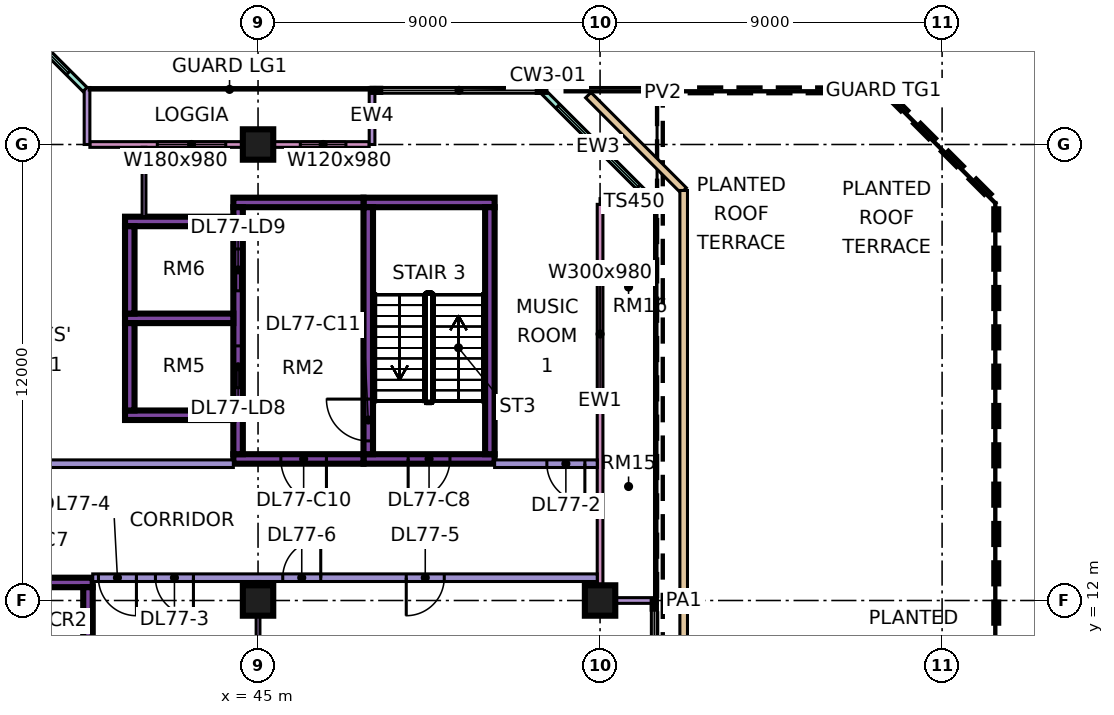
"""IFC4 building model, lengths in metres.
Left out: names, types, materials, properties, quantities, classifications, styles, units other than length and angle.
Written with IfcOpenShell. Run it as: python <this file> out.ifc"""

import sys

from ifc_helpers import new_model, si_unit, direction, frame, frame_2d, origin, origin_2d, place, context, subcontext, project, spatial, rectangle, extrude, element, fill, save


model = new_model("IFC4")
c1 = context("Model", 3, precision=1e-05, world=origin(), true_north=direction((0.0, 1.0)))
c2 = subcontext(c1, "Body", "Model", "MODEL_VIEW")
j1 = project(units=[si_unit("LENGTHUNIT", "METRE"), si_unit("PLANEANGLEUNIT", "RADIAN")], contexts=[c1])
p1 = place(None, origin())
s1 = spatial("IfcSite", under=j1, at=p1, CompositionType="ELEMENT")
p2 = place(p1, origin())
s2 = spatial("IfcBuilding", under=s1, at=p2, CompositionType="ELEMENT")
p3 = place(p2, frame((0.0, 0.0, 327.65)))
s3 = spatial("IfcBuildingStorey", under=s2, at=p3, CompositionType="ELEMENT", Elevation=327.65)
for number, where, z_axis, x_axis in (
    (1, (45.0, 12.0, 0.0), (0.0, 0.0, 1.0), (1.0, 0.0, 0.0)),
    (2, (45.0, 24.0, 0.0), (0.0, 0.0, 1.0), (1.0, 0.0, 0.0)),
    (3, (54.0, 12.0, 0.0), (0.0, 0.0, 1.0), (1.0, 0.0, 0.0)),
):
    element("IfcColumn", number, at=place(p3, frame(where, z_axis=z_axis, x_axis=x_axis)), inside=s3, PredefinedType="COLUMN", context=c2, shape_type="SweptSolid", body=[
        extrude(rectangle(XDim=0.8, YDim=0.8, at=origin_2d()), origin(), (0.0, 0.0, 1.0), 11.25),
    ])
p4 = place(p3, frame((36.4, 12.475, 0.0), z_axis=(0.0, 0.0, 1.0), x_axis=(1.0, 0.0, 0.0)))
e4 = element("IfcWall", 4, at=p4, inside=s3, PredefinedType="SHEAR", context=c2, shape_type="SweptSolid", body=[
    extrude(rectangle(XDim=4.25, YDim=0.25, at=frame_2d((2.125, 0.0))), origin(), (0.0, 0.0, 1.0), 11.25),
])
p5 = place(p4, frame((1.975, 0.0, 0.0)))
e5 = element("IfcOpeningElement", 5, at=p5, cuts=e4, PredefinedType="OPENING", context=c2, shape_type="SweptSolid", body=[
    extrude(rectangle(XDim=1.1, YDim=2.2, at=frame_2d((0.55, 1.1))), frame((0.0, 0.135, 0.0), z_axis=(0.0, -1.0, 0.0), x_axis=(1.0, 0.0, 0.0)), (0.0, 0.0, 1.0), 0.27),
])
p6 = place(p3, frame((40.525, 5.85, 0.0), z_axis=(0.0, 0.0, 1.0), x_axis=(0.0, 1.0, 0.0)))
e6 = element("IfcWall", 6, at=p6, inside=s3, PredefinedType="SHEAR", context=c2, shape_type="SweptSolid", body=[
    extrude(rectangle(XDim=6.5, YDim=0.25, at=frame_2d((3.25, 0.0))), origin(), (0.0, 0.0, 1.0), 11.25),
])
p7 = place(p3, frame((47.775, 15.725, 0.0), z_axis=(0.0, 0.0, 1.0), x_axis=(1.0, 0.0, 0.0)))
e7 = element("IfcWall", 7, at=p7, inside=s3, PredefinedType="SHEAR", context=c2, shape_type="SweptSolid", body=[
    extrude(rectangle(XDim=3.45, YDim=0.25, at=frame_2d((1.725, 0.0))), origin(), (0.0, 0.0, 1.0), 11.25),
])
p8 = place(p7, frame((1.175, 0.0, 0.0)))
e8 = element("IfcOpeningElement", 8, at=p8, cuts=e7, PredefinedType="OPENING", context=c2, shape_type="SweptSolid", body=[
    extrude(rectangle(XDim=1.1, YDim=2.2, at=frame_2d((0.55, 1.1))), frame((0.0, 0.135, 0.0), z_axis=(0.0, -1.0, 0.0), x_axis=(1.0, 0.0, 0.0)), (0.0, 0.0, 1.0), 0.27),
])
p9 = place(p3, frame((47.775, 22.475, 0.0), z_axis=(0.0, 0.0, 1.0), x_axis=(1.0, 0.0, 0.0)))
e9 = element("IfcWall", 9, at=p9, inside=s3, PredefinedType="SHEAR", context=c2, shape_type="SweptSolid", body=[
    extrude(rectangle(XDim=3.45, YDim=0.25, at=frame_2d((1.725, 0.0))), origin(), (0.0, 0.0, 1.0), 11.25),
])
p10 = place(p3, frame((47.9, 15.85, 0.0), z_axis=(0.0, 0.0, 1.0), x_axis=(0.0, 1.0, 0.0)))
e10 = element("IfcWall", 10, at=p10, inside=s3, PredefinedType="SHEAR", context=c2, shape_type="SweptSolid", body=[
    extrude(rectangle(XDim=6.5, YDim=0.25, at=frame_2d((3.25, 0.0))), origin(), (0.0, 0.0, 1.0), 11.25),
])
p11 = place(p10, frame((0.35, 0.0, 0.0)))
e11 = element("IfcOpeningElement", 11, at=p11, cuts=e10, PredefinedType="OPENING", context=c2, shape_type="SweptSolid", body=[
    extrude(rectangle(XDim=1.1, YDim=2.2, at=frame_2d((0.55, 1.1))), frame((0.0, 0.135, 0.0), z_axis=(0.0, -1.0, 0.0), x_axis=(1.0, 0.0, 0.0)), (0.0, 0.0, 1.0), 0.27),
])
p12 = place(p3, frame((51.1, 15.85, 0.0), z_axis=(0.0, 0.0, 1.0), x_axis=(0.0, 1.0, 0.0)))
e12 = element("IfcWall", 12, at=p12, inside=s3, PredefinedType="SHEAR", context=c2, shape_type="SweptSolid", body=[
    extrude(rectangle(XDim=6.5, YDim=0.25, at=frame_2d((3.25, 0.0))), origin(), (0.0, 0.0, 1.0), 11.25),
])
p13 = place(p3, frame((44.35, 15.725, 0.0), z_axis=(0.0, 0.0, 1.0), x_axis=(1.0, 0.0, 0.0)))
e13 = element("IfcWall", 13, at=p13, inside=s3, PredefinedType="SHEAR", context=c2, shape_type="SweptSolid", body=[
    extrude(rectangle(XDim=3.425, YDim=0.25, at=frame_2d((1.712, 0.0))), origin(), (0.0, 0.0, 1.0), 11.25),
])
p14 = place(p13, frame((1.25, 0.0, 0.0)))
e14 = element("IfcOpeningElement", 14, at=p14, cuts=e13, PredefinedType="OPENING", context=c2, shape_type="SweptSolid", body=[
    extrude(rectangle(XDim=1.2, YDim=2.2, at=frame_2d((0.6, 1.1))), frame((0.0, 0.135, 0.0), z_axis=(0.0, -1.0, 0.0), x_axis=(1.0, 0.0, 0.0)), (0.0, 0.0, 1.0), 0.27),
])
p15 = place(p3, frame((44.35, 22.475, 0.0), z_axis=(0.0, 0.0, 1.0), x_axis=(1.0, 0.0, 0.0)))
e15 = element("IfcWall", 15, at=p15, inside=s3, PredefinedType="SHEAR", context=c2, shape_type="SweptSolid", body=[
    extrude(rectangle(XDim=3.425, YDim=0.25, at=frame_2d((1.712, 0.0))), origin(), (0.0, 0.0, 1.0), 11.25),
])
p16 = place(p3, frame((44.475, 15.85, 0.0), z_axis=(0.0, 0.0, 1.0), x_axis=(0.0, 1.0, 0.0)))
e16 = element("IfcWall", 16, at=p16, inside=s3, PredefinedType="SHEAR", context=c2, shape_type="SweptSolid", body=[
    extrude(rectangle(XDim=6.5, YDim=0.25, at=frame_2d((3.25, 0.0))), origin(), (0.0, 0.0, 1.0), 11.25),
])
p17 = place(p16, frame((1.75, 0.0, 0.0)))
e17 = element("IfcOpeningElement", 17, at=p17, cuts=e16, PredefinedType="OPENING", context=c2, shape_type="SweptSolid", body=[
    extrude(rectangle(XDim=1.1, YDim=2.2, at=frame_2d((0.55, 1.1))), frame((0.0, 0.135, 0.0), z_axis=(0.0, -1.0, 0.0), x_axis=(1.0, 0.0, 0.0)), (0.0, 0.0, 1.0), 0.27),
])
p18 = place(p16, frame((4.3, 0.0, 0.0)))
e18 = element("IfcOpeningElement", 18, at=p18, cuts=e16, PredefinedType="OPENING", context=c2, shape_type="SweptSolid", body=[
    extrude(rectangle(XDim=1.1, YDim=2.2, at=frame_2d((0.55, 1.1))), frame((0.0, 0.135, 0.0), z_axis=(0.0, -1.0, 0.0), x_axis=(1.0, 0.0, 0.0)), (0.0, 0.0, 1.0), 0.27),
])
for number, where, z_axis, x_axis in (
    (19, (41.5, 16.875, 0.0), (0.0, 0.0, 1.0), (1.0, 0.0, 0.0)),
    (20, (41.5, 19.425, 0.0), (0.0, 0.0, 1.0), (1.0, 0.0, 0.0)),
    (21, (41.5, 21.975, 0.0), (0.0, 0.0, 1.0), (1.0, 0.0, 0.0)),
):
    element("IfcWall", number, at=place(p3, frame(where, z_axis=z_axis, x_axis=x_axis)), inside=s3, PredefinedType="SHEAR", context=c2, shape_type="SweptSolid", body=[
        extrude(rectangle(XDim=2.85, YDim=0.25, at=frame_2d((1.425, 0.0))), origin(), (0.0, 0.0, 1.0), 11.25),
    ])
for number, where, z_axis, x_axis in (
    (22, (41.625, 17.0, 0.0), (0.0, 0.0, 1.0), (0.0, 1.0, 0.0)),
    (23, (41.625, 19.55, 0.0), (0.0, 0.0, 1.0), (0.0, 1.0, 0.0)),
):
    element("IfcWall", number, at=place(p3, frame(where, z_axis=z_axis, x_axis=x_axis)), inside=s3, PredefinedType="SHEAR", context=c2, shape_type="SweptSolid", body=[
        extrude(rectangle(XDim=2.3, YDim=0.25, at=frame_2d((1.15, 0.0))), origin(), (0.0, 0.0, 1.0), 11.25),
    ])
p19 = place(p3, frame((47.925, 24.0, 0.0), z_axis=(0.0, 0.0, 1.0), x_axis=(-1.0, 0.0, 0.0)))
e24 = element("IfcWall", 24, at=p19, inside=s3, PredefinedType="SOLIDWALL", context=c2, shape_type="SweptSolid", body=[
    extrude(rectangle(XDim=7.35, YDim=0.15, at=frame_2d((3.675, 0.0))), origin(), (0.0, 0.0, 1.0), 10.85),
])
p20 = place(p19, frame((0.613, 0.0, 0.45)))
e25 = element("IfcOpeningElement", 25, at=p20, cuts=e24, PredefinedType="OPENING", context=c2, shape_type="SweptSolid", body=[
    extrude(rectangle(XDim=1.2, YDim=9.8, at=frame_2d((0.6, 4.9))), frame((0.0, 0.085, 0.0), z_axis=(0.0, -1.0, 0.0), x_axis=(1.0, 0.0, 0.0)), (0.0, 0.0, 1.0), 0.17),
])
p21 = place(p19, frame((3.775, 0.0, 0.45)))
e26 = element("IfcOpeningElement", 26, at=p21, cuts=e24, PredefinedType="OPENING", context=c2, shape_type="SweptSolid", body=[
    extrude(rectangle(XDim=1.8, YDim=9.8, at=frame_2d((0.9, 4.9))), frame((0.0, 0.085, 0.0), z_axis=(0.0, -1.0, 0.0), x_axis=(1.0, 0.0, 0.0)), (0.0, 0.0, 1.0), 0.17),
])
for number, where, z_axis, x_axis in (
    (27, (48.0, 25.5, 0.0), (0.0, 0.0, 1.0), (0.0, -1.0, 0.0)),
    (28, (40.5, 25.5, 0.0), (0.0, 0.0, 1.0), (0.0, -1.0, 0.0)),
):
    element("IfcWall", number, at=place(p3, frame(where, z_axis=z_axis, x_axis=x_axis)), inside=s3, PredefinedType="SOLIDWALL", context=c2, shape_type="SweptSolid", body=[
        extrude(rectangle(XDim=1.5, YDim=0.15, at=frame_2d((0.75, 0.0))), origin(), (0.0, 0.0, 1.0), 10.85),
    ])
p22 = place(p3, frame((40.447, 25.447, 0.0), z_axis=(0.0, 0.0, 1.0), x_axis=(-0.707106781187, 0.707106781187, 0.0)))
e29 = element("IfcWall", 29, at=p22, inside=s3, PredefinedType="SOLIDWALL", context=c2, shape_type="SweptSolid", body=[
    extrude(rectangle(XDim=4.243, YDim=0.15, at=frame_2d((2.121, 0.0))), origin(), (0.0, 0.0, 1.0), 10.85),
])
p23 = place(p22, frame((0.621, 0.0, 0.45)))
e30 = element("IfcOpeningElement", 30, at=p23, cuts=e29, PredefinedType="OPENING", context=c2, shape_type="SweptSolid", body=[
    extrude(rectangle(XDim=3.0, YDim=9.8, at=frame_2d((1.5, 4.9))), frame((0.0, 0.085, 0.0), z_axis=(0.0, -1.0, 0.0), x_axis=(1.0, 0.0, 0.0)), (0.0, 0.0, 1.0), 0.17),
])
p24 = place(p3, frame((54.0, 12.075, 0.0), z_axis=(0.0, 0.0, 1.0), x_axis=(0.0, 1.0, 0.0)))
e31 = element("IfcWall", 31, at=p24, inside=s3, PredefinedType="SOLIDWALL", context=c2, shape_type="SweptSolid", body=[
    extrude(rectangle(XDim=10.35, YDim=0.15, at=frame_2d((5.175, 0.0))), origin(), (0.0, 0.0, 1.0), 10.85),
])
p25 = place(p24, frame((5.438, 0.0, 0.45)))
e32 = element("IfcOpeningElement", 32, at=p25, cuts=e31, PredefinedType="OPENING", context=c2, shape_type="SweptSolid", body=[
    extrude(rectangle(XDim=3.0, YDim=9.8, at=frame_2d((1.5, 4.9))), frame((0.0, 0.085, 0.0), z_axis=(0.0, -1.0, 0.0), x_axis=(1.0, 0.0, 0.0)), (0.0, 0.0, 1.0), 0.17),
])
for number, where, z_axis, x_axis in (
    (33, (55.5, 12.0, 0.0), (0.0, 0.0, 1.0), (-1.0, 0.0, 0.0)),
    (34, (55.5, 22.5, 0.0), (0.0, 0.0, 1.0), (-1.0, 0.0, 0.0)),
):
    element("IfcWall", number, at=place(p3, frame(where, z_axis=z_axis, x_axis=x_axis)), inside=s3, PredefinedType="SOLIDWALL", context=c2, shape_type="SweptSolid", body=[
        extrude(rectangle(XDim=1.5, YDim=0.15, at=frame_2d((0.75, 0.0))), origin(), (0.0, 0.0, 1.0), 10.85),
    ])
p26 = place(p3, frame((55.447, 22.447, 0.0), z_axis=(0.0, 0.0, 1.0), x_axis=(-0.707106781187, 0.707106781187, 0.0)))
e35 = element("IfcWall", 35, at=p26, inside=s3, PredefinedType="SOLIDWALL", context=c2, shape_type="SweptSolid", body=[
    extrude(rectangle(XDim=4.243, YDim=0.15, at=frame_2d((2.121, 0.0))), origin(), (0.0, 0.0, 1.0), 10.85),
])
p27 = place(p26, frame((0.621, 0.0, 0.45)))
e36 = element("IfcOpeningElement", 36, at=p27, cuts=e35, PredefinedType="OPENING", context=c2, shape_type="SweptSolid", body=[
    extrude(rectangle(XDim=3.0, YDim=9.8, at=frame_2d((1.5, 4.9))), frame((0.0, 0.085, 0.0), z_axis=(0.0, -1.0, 0.0), x_axis=(1.0, 0.0, 0.0)), (0.0, 0.0, 1.0), 0.17),
])
p28 = place(p3, frame((53.69, 25.3, 0.0), z_axis=(0.0, 0.0, 1.0), x_axis=(0.707106781187, -0.707106781187, 0.0)))
e37 = element("IfcWall", 37, at=p28, inside=s3, PredefinedType="PARAPET", context=c2, shape_type="SweptSolid", body=[
    extrude(rectangle(XDim=3.55, YDim=0.2, at=frame_2d((1.775, 0.0))), origin(), (0.0, 0.0, 1.0), 0.5),
])
p29 = place(p3, frame((56.2, 22.79, 0.0), z_axis=(0.0, 0.0, 1.0), x_axis=(0.0, -1.0, 0.0)))
e38 = element("IfcWall", 38, at=p29, inside=s3, PredefinedType="PARAPET", context=c2, shape_type="SweptSolid", body=[
    extrude(rectangle(XDim=21.58, YDim=0.2, at=frame_2d((10.79, 0.0))), origin(), (0.0, 0.0, 1.0), 0.5),
])
p30 = place(p3, frame((34.0, 15.6, 0.0), z_axis=(0.0, 0.0, 1.0), x_axis=(1.0, 0.0, 0.0)))
e39 = element("IfcWall", 39, at=p30, inside=s3, PredefinedType="PARTITIONING", context=c2, shape_type="SweptSolid", body=[
    extrude(rectangle(XDim=10.35, YDim=0.2, at=frame_2d((5.175, 0.0))), origin(), (0.0, 0.0, 1.0), 10.85),
])
p31 = place(p30, frame((3.6, 0.0, 0.0)))
e40 = element("IfcOpeningElement", 40, at=p31, cuts=e39, PredefinedType="OPENING", context=c2, shape_type="SweptSolid", body=[
    extrude(rectangle(XDim=1.0, YDim=2.1, at=frame_2d((0.5, 1.05))), frame((0.0, 0.11, 0.0), z_axis=(0.0, -1.0, 0.0), x_axis=(1.0, 0.0, 0.0)), (0.0, 0.0, 1.0), 0.22),
])
p32 = place(p3, frame((40.65, 12.6, 0.0), z_axis=(0.0, 0.0, 1.0), x_axis=(1.0, 0.0, 0.0)))
e41 = element("IfcWall", 41, at=p32, inside=s3, PredefinedType="PARTITIONING", context=c2, shape_type="SweptSolid", body=[
    extrude(rectangle(XDim=13.276, YDim=0.2, at=frame_2d((6.638, 0.0))), origin(), (0.0, 0.0, 1.0), 10.85),
])
p33 = place(p32, frame((1.65, 0.0, 0.0)))
e42 = element("IfcOpeningElement", 42, at=p33, cuts=e41, PredefinedType="OPENING", context=c2, shape_type="SweptSolid", body=[
    extrude(rectangle(XDim=1.0, YDim=2.1, at=frame_2d((0.5, 1.05))), frame((0.0, 0.11, 0.0), z_axis=(0.0, -1.0, 0.0), x_axis=(1.0, 0.0, 0.0)), (0.0, 0.0, 1.0), 0.22),
])
p34 = place(p32, frame((0.15, 0.0, 0.0)))
e43 = element("IfcOpeningElement", 43, at=p34, cuts=e41, PredefinedType="OPENING", context=c2, shape_type="SweptSolid", body=[
    extrude(rectangle(XDim=1.0, YDim=2.1, at=frame_2d((0.5, 1.05))), frame((0.0, 0.11, 0.0), z_axis=(0.0, -1.0, 0.0), x_axis=(1.0, 0.0, 0.0)), (0.0, 0.0, 1.0), 0.22),
])
p35 = place(p32, frame((8.25, 0.0, 0.0)))
e44 = element("IfcOpeningElement", 44, at=p35, cuts=e41, PredefinedType="OPENING", context=c2, shape_type="SweptSolid", body=[
    extrude(rectangle(XDim=1.0, YDim=2.1, at=frame_2d((0.5, 1.05))), frame((0.0, 0.11, 0.0), z_axis=(0.0, -1.0, 0.0), x_axis=(1.0, 0.0, 0.0)), (0.0, 0.0, 1.0), 0.22),
])
p36 = place(p32, frame((5.0, 0.0, 0.0)))
e45 = element("IfcOpeningElement", 45, at=p36, cuts=e41, PredefinedType="OPENING", context=c2, shape_type="SweptSolid", body=[
    extrude(rectangle(XDim=1.0, YDim=2.1, at=frame_2d((0.5, 1.05))), frame((0.0, 0.11, 0.0), z_axis=(0.0, -1.0, 0.0), x_axis=(1.0, 0.0, 0.0)), (0.0, 0.0, 1.0), 0.22),
])
p37 = place(p3, frame((42.0, 22.1, 0.0), z_axis=(0.0, 0.0, 1.0), x_axis=(0.0, 1.0, 0.0)))
e46 = element("IfcWall", 46, at=p37, inside=s3, PredefinedType="PARTITIONING", context=c2, shape_type="SweptSolid", body=[
    extrude(rectangle(XDim=1.826, YDim=0.1, at=frame_2d((0.913, 0.0))), origin(), (0.0, 0.0, 1.0), 10.85),
])
p38 = place(p3, frame((45.0, 0.074, 0.0), z_axis=(0.0, 0.0, 1.0), x_axis=(0.0, 1.0, 0.0)))
e47 = element("IfcWall", 47, at=p38, inside=s3, PredefinedType="PARTITIONING", context=c2, shape_type="SweptSolid", body=[
    extrude(rectangle(XDim=12.426, YDim=0.1, at=frame_2d((6.213, 0.0))), origin(), (0.0, 0.0, 1.0), 10.85),
])
p39 = place(p3, frame((51.225, 15.6, 0.0), z_axis=(0.0, 0.0, 1.0), x_axis=(1.0, 0.0, 0.0)))
e48 = element("IfcWall", 48, at=p39, inside=s3, PredefinedType="PARTITIONING", context=c2, shape_type="SweptSolid", body=[
    extrude(rectangle(XDim=2.701, YDim=0.2, at=frame_2d((1.351, 0.0))), origin(), (0.0, 0.0, 1.0), 10.85),
])
p40 = place(p39, frame((1.375, 0.0, 0.0)))
e49 = element("IfcOpeningElement", 49, at=p40, cuts=e48, PredefinedType="OPENING", context=c2, shape_type="SweptSolid", body=[
    extrude(rectangle(XDim=1.0, YDim=2.1, at=frame_2d((0.5, 1.05))), frame((0.0, 0.11, 0.0), z_axis=(0.0, -1.0, 0.0), x_axis=(1.0, 0.0, 0.0)), (0.0, 0.0, 1.0), 0.22),
])
p41 = place(p20, origin())
e50 = element("IfcWindow", 50, at=p41, inside=s3, PartitioningType="SINGLE_PANEL", PredefinedType="WINDOW", context=c2, shape_type="SweptSolid", body=[
    extrude(rectangle(XDim=1.2, YDim=9.8, at=frame_2d((0.6, 4.9))), frame((0.0, 0.03, 0.0), z_axis=(0.0, -1.0, 0.0), x_axis=(1.0, 0.0, 0.0)), (0.0, 0.0, 1.0), 0.06),
])
fill(e25, e50)
p42 = place(p21, origin())
e51 = element("IfcWindow", 51, at=p42, inside=s3, PartitioningType="SINGLE_PANEL", PredefinedType="WINDOW", context=c2, shape_type="SweptSolid", body=[
    extrude(rectangle(XDim=1.8, YDim=9.8, at=frame_2d((0.9, 4.9))), frame((0.0, 0.03, 0.0), z_axis=(0.0, -1.0, 0.0), x_axis=(1.0, 0.0, 0.0)), (0.0, 0.0, 1.0), 0.06),
])
fill(e26, e51)
p43 = place(p23, origin())
e52 = element("IfcWindow", 52, at=p43, inside=s3, PartitioningType="SINGLE_PANEL", PredefinedType="WINDOW", context=c2, shape_type="SweptSolid", body=[
    extrude(rectangle(XDim=3.0, YDim=9.8, at=frame_2d((1.5, 4.9))), frame((0.0, 0.03, 0.0), z_axis=(0.0, -1.0, 0.0), x_axis=(1.0, 0.0, 0.0)), (0.0, 0.0, 1.0), 0.06),
])
fill(e30, e52)
p44 = place(p25, origin())
e53 = element("IfcWindow", 53, at=p44, inside=s3, PartitioningType="SINGLE_PANEL", PredefinedType="WINDOW", context=c2, shape_type="SweptSolid", body=[
    extrude(rectangle(XDim=3.0, YDim=9.8, at=frame_2d((1.5, 4.9))), frame((0.0, 0.03, 0.0), z_axis=(0.0, -1.0, 0.0), x_axis=(1.0, 0.0, 0.0)), (0.0, 0.0, 1.0), 0.06),
])
fill(e32, e53)
p45 = place(p27, origin())
e54 = element("IfcWindow", 54, at=p45, inside=s3, PartitioningType="SINGLE_PANEL", PredefinedType="WINDOW", context=c2, shape_type="SweptSolid", body=[
    extrude(rectangle(XDim=3.0, YDim=9.8, at=frame_2d((1.5, 4.9))), frame((0.0, 0.03, 0.0), z_axis=(0.0, -1.0, 0.0), x_axis=(1.0, 0.0, 0.0)), (0.0, 0.0, 1.0), 0.06),
])
fill(e36, e54)
p46 = place(p8, frame((1.1, 0.0, 0.0), z_axis=(0.0, 0.0, 1.0), x_axis=(-1.0, 0.0, 0.0)))
e55 = element("IfcDoor", 55, at=p46, inside=s3, OperationType="SINGLE_SWING_LEFT", PredefinedType="DOOR", context=c2, shape_type="SweptSolid", body=[
    extrude(rectangle(XDim=1.1, YDim=2.2, at=frame_2d((0.55, 1.1))), frame((0.0, 0.025, 0.0), z_axis=(0.0, -1.0, 0.0), x_axis=(1.0, 0.0, 0.0)), (0.0, 0.0, 1.0), 0.05),
])
fill(e8, e55)
p47 = place(p14, origin())
e56 = element("IfcDoor", 56, at=p47, inside=s3, OperationType="SINGLE_SWING_RIGHT", PredefinedType="DOOR", context=c2, shape_type="SweptSolid", body=[
    extrude(rectangle(XDim=1.2, YDim=2.2, at=frame_2d((0.6, 1.1))), frame((0.0, 0.025, 0.0), z_axis=(0.0, -1.0, 0.0), x_axis=(1.0, 0.0, 0.0)), (0.0, 0.0, 1.0), 0.05),
])
fill(e14, e56)
p48 = place(p11, frame((1.1, 0.0, 0.0), z_axis=(0.0, 0.0, 1.0), x_axis=(-1.0, 0.0, 0.0)))
e57 = element("IfcDoor", 57, at=p48, inside=s3, OperationType="SINGLE_SWING_RIGHT", PredefinedType="DOOR", context=c2, shape_type="SweptSolid", body=[
    extrude(rectangle(XDim=1.1, YDim=2.2, at=frame_2d((0.55, 1.1))), frame((0.0, 0.025, 0.0), z_axis=(0.0, -1.0, 0.0), x_axis=(1.0, 0.0, 0.0)), (0.0, 0.0, 1.0), 0.05),
])
fill(e11, e57)
p49 = place(p17, origin())
e58 = element("IfcDoor", 58, at=p49, inside=s3, OperationType="DOUBLE_DOOR_SLIDING", PredefinedType="DOOR", context=c2, shape_type="SweptSolid", body=[
    extrude(rectangle(XDim=1.1, YDim=2.2, at=frame_2d((0.55, 1.1))), frame((0.0, 0.025, 0.0), z_axis=(0.0, -1.0, 0.0), x_axis=(1.0, 0.0, 0.0)), (0.0, 0.0, 1.0), 0.05),
])
fill(e17, e58)
p50 = place(p18, origin())
e59 = element("IfcDoor", 59, at=p50, inside=s3, OperationType="DOUBLE_DOOR_SLIDING", PredefinedType="DOOR", context=c2, shape_type="SweptSolid", body=[
    extrude(rectangle(XDim=1.1, YDim=2.2, at=frame_2d((0.55, 1.1))), frame((0.0, 0.025, 0.0), z_axis=(0.0, -1.0, 0.0), x_axis=(1.0, 0.0, 0.0)), (0.0, 0.0, 1.0), 0.05),
])
fill(e18, e59)
p51 = place(p40, origin())
e60 = element("IfcDoor", 60, at=p51, inside=s3, OperationType="SINGLE_SWING_RIGHT", PredefinedType="DOOR", context=c2, shape_type="SweptSolid", body=[
    extrude(rectangle(XDim=1.0, YDim=2.1, at=frame_2d((0.5, 1.05))), frame((0.0, 0.025, 0.0), z_axis=(0.0, -1.0, 0.0), x_axis=(1.0, 0.0, 0.0)), (0.0, 0.0, 1.0), 0.05),
])
fill(e49, e60)
p52 = place(p33, origin())
e61 = element("IfcDoor", 61, at=p52, inside=s3, OperationType="SINGLE_SWING_RIGHT", PredefinedType="DOOR", context=c2, shape_type="SweptSolid", body=[
    extrude(rectangle(XDim=1.0, YDim=2.1, at=frame_2d((0.5, 1.05))), frame((0.0, 0.025, 0.0), z_axis=(0.0, -1.0, 0.0), x_axis=(1.0, 0.0, 0.0)), (0.0, 0.0, 1.0), 0.05),
])
fill(e42, e61)
p53 = place(p34, origin())
e62 = element("IfcDoor", 62, at=p53, inside=s3, OperationType="SINGLE_SWING_RIGHT", PredefinedType="DOOR", context=c2, shape_type="SweptSolid", body=[
    extrude(rectangle(XDim=1.0, YDim=2.1, at=frame_2d((0.5, 1.05))), frame((0.0, 0.025, 0.0), z_axis=(0.0, -1.0, 0.0), x_axis=(1.0, 0.0, 0.0)), (0.0, 0.0, 1.0), 0.05),
])
fill(e43, e62)
p54 = place(p35, frame((1.0, 0.0, 0.0), z_axis=(0.0, 0.0, 1.0), x_axis=(-1.0, 0.0, 0.0)))
e63 = element("IfcDoor", 63, at=p54, inside=s3, OperationType="SINGLE_SWING_LEFT", PredefinedType="DOOR", context=c2, shape_type="SweptSolid", body=[
    extrude(rectangle(XDim=1.0, YDim=2.1, at=frame_2d((0.5, 1.05))), frame((0.0, 0.025, 0.0), z_axis=(0.0, -1.0, 0.0), x_axis=(1.0, 0.0, 0.0)), (0.0, 0.0, 1.0), 0.05),
])
fill(e44, e63)
p55 = place(p36, frame((1.0, 0.0, 0.0), z_axis=(0.0, 0.0, 1.0), x_axis=(-1.0, 0.0, 0.0)))
e64 = element("IfcDoor", 64, at=p55, inside=s3, OperationType="SINGLE_SWING_RIGHT", PredefinedType="DOOR", context=c2, shape_type="SweptSolid", body=[
    extrude(rectangle(XDim=1.0, YDim=2.1, at=frame_2d((0.5, 1.05))), frame((0.0, 0.025, 0.0), z_axis=(0.0, -1.0, 0.0), x_axis=(1.0, 0.0, 0.0)), (0.0, 0.0, 1.0), 0.05),
])
fill(e45, e64)
save(model, sys.argv[1])
